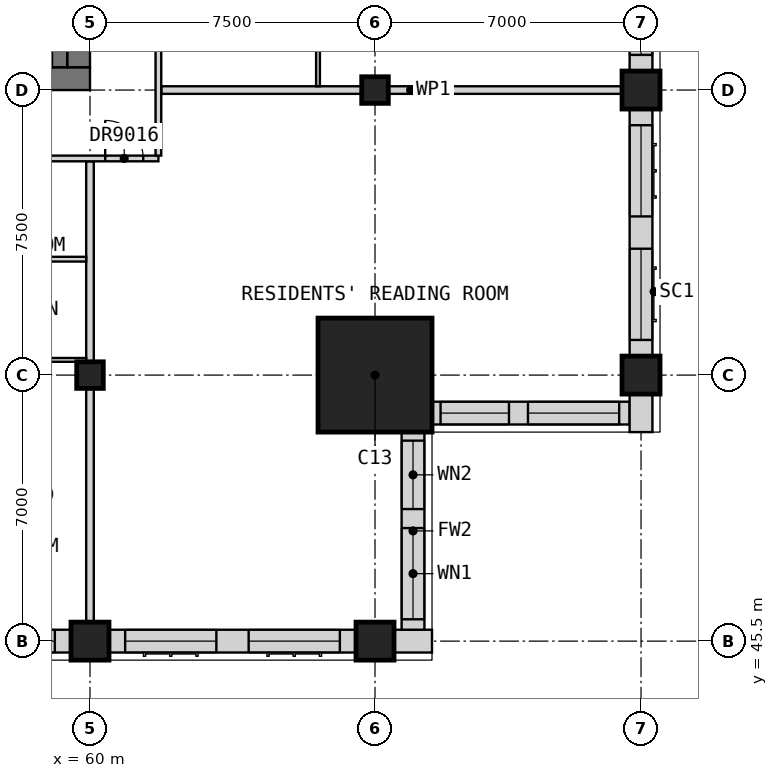
"""IFC4 building model, lengths in metres.
Left out: names, types, materials, properties, quantities, classifications, styles, units other than length and angle.
Written with IfcOpenShell. Run it as: python <this file> out.ifc"""

import sys

from ifc_helpers import new_model, si_unit, direction, frame, frame_2d, origin, origin_2d, place, context, subcontext, project, spatial, rectangle, extrude, element, fill, save


model = new_model("IFC4")
c1 = context("Model", 3, precision=1e-05, world=origin(), true_north=direction((0.0, 1.0)))
c2 = subcontext(c1, "Body", "Model", "MODEL_VIEW")
j1 = project(units=[si_unit("LENGTHUNIT", "METRE"), si_unit("PLANEANGLEUNIT", "RADIAN")], contexts=[c1])
p1 = place(None, origin())
s1 = spatial("IfcSite", under=j1, at=p1, CompositionType="ELEMENT")
p2 = place(p1, origin())
s2 = spatial("IfcBuilding", under=s1, at=p2, CompositionType="ELEMENT")
p3 = place(p2, frame((0.0, 0.0, 280.2)))
s3 = spatial("IfcBuildingStorey", under=s2, at=p3, CompositionType="ELEMENT", Elevation=280.2)
p4 = place(p3, frame((60.0, 45.5, 0.0), z_axis=(0.0, 0.0, 1.0), x_axis=(1.0, 0.0, 0.0)))
e1 = element("IfcColumn", 1, at=p4, inside=s3, PredefinedType="COLUMN", context=c2, shape_type="SweptSolid", body=[
    extrude(rectangle(XDim=1.0, YDim=1.0, at=origin_2d()), origin(), (0.0, 0.0, 1.0), 3.5),
])
p5 = place(p3, frame((60.0, 52.5, 0.0), z_axis=(0.0, 0.0, 1.0), x_axis=(1.0, 0.0, 0.0)))
e2 = element("IfcColumn", 2, at=p5, inside=s3, PredefinedType="COLUMN", context=c2, shape_type="SweptSolid", body=[
    extrude(rectangle(XDim=0.7, YDim=0.7, at=origin_2d()), origin(), (0.0, 0.0, 1.0), 3.5),
])
p6 = place(p3, frame((67.5, 45.5, 0.0), z_axis=(0.0, 0.0, 1.0), x_axis=(1.0, 0.0, 0.0)))
e3 = element("IfcColumn", 3, at=p6, inside=s3, PredefinedType="COLUMN", context=c2, shape_type="SweptSolid", body=[
    extrude(rectangle(XDim=1.0, YDim=1.0, at=origin_2d()), origin(), (0.0, 0.0, 1.0), 3.5),
])
p7 = place(p3, frame((67.5, 60.0, 0.0), z_axis=(0.0, 0.0, 1.0), x_axis=(1.0, 0.0, 0.0)))
e4 = element("IfcColumn", 4, at=p7, inside=s3, PredefinedType="COLUMN", context=c2, shape_type="SweptSolid", body=[
    extrude(rectangle(XDim=0.7, YDim=0.7, at=origin_2d()), origin(), (0.0, 0.0, 1.0), 3.5),
])
for number, where, z_axis, x_axis in (
    (5, (74.5, 52.5, 0.0), (0.0, 0.0, 1.0), (1.0, 0.0, 0.0)),
    (6, (74.5, 60.0, 0.0), (0.0, 0.0, 1.0), (1.0, 0.0, 0.0)),
):
    element("IfcColumn", number, at=place(p3, frame(where, z_axis=z_axis, x_axis=x_axis)), inside=s3, PredefinedType="COLUMN", context=c2, shape_type="SweptSolid", body=[
        extrude(rectangle(XDim=1.0, YDim=1.0, at=origin_2d()), origin(), (0.0, 0.0, 1.0), 3.5),
    ])
p8 = place(p3, frame((67.5, 52.5, 0.0), z_axis=(0.0, 0.0, 1.0), x_axis=(1.0, 0.0, 0.0)))
e7 = element("IfcColumn", 7, at=p8, inside=s3, PredefinedType="COLUMN", context=c2, shape_type="SweptSolid", body=[
    extrude(rectangle(XDim=3.0, YDim=3.0, at=origin_2d()), origin(), (0.0, 0.0, 1.0), 3.5),
])
p9 = place(p3, frame((30.0, 60.3, 0.0), z_axis=(0.0, 0.0, 1.0), x_axis=(1.0, 0.0, 0.0)))
e8 = element("IfcWall", 8, at=p9, inside=s3, PredefinedType="SHEAR", context=c2, shape_type="SweptSolid", body=[
    extrude(rectangle(XDim=30.0, YDim=0.6, at=frame_2d((15.0, 0.0))), origin(), (0.0, 0.0, 1.0), 3.5),
])
p10 = place(p9, frame((21.9, 0.0, 0.0)))
e9 = element("IfcOpeningElement", 9, at=p10, cuts=e8, PredefinedType="OPENING", context=c2, shape_type="SweptSolid", body=[
    extrude(rectangle(XDim=1.8, YDim=2.1, at=frame_2d((0.9, 1.05))), frame((0.0, 0.31, 0.0), z_axis=(0.0, -1.0, 0.0), x_axis=(1.0, 0.0, 0.0)), (0.0, 0.0, 1.0), 0.62),
])
p11 = place(p9, frame((26.5, 0.0, 0.0)))
e10 = element("IfcOpeningElement", 10, at=p11, cuts=e8, PredefinedType="OPENING", context=c2, shape_type="SweptSolid", body=[
    extrude(rectangle(XDim=1.2, YDim=2.1, at=frame_2d((0.6, 1.05))), frame((0.0, 0.31, 0.0), z_axis=(0.0, -1.0, 0.0), x_axis=(1.0, 0.0, 0.0)), (0.0, 0.0, 1.0), 0.62),
])
p12 = place(p3, frame((59.7, 60.6, 0.0), z_axis=(0.0, 0.0, 1.0), x_axis=(0.0, 1.0, 0.0)))
e11 = element("IfcWall", 11, at=p12, inside=s3, PredefinedType="SHEAR", context=c2, shape_type="SweptSolid", body=[
    extrude(rectangle(XDim=21.3, YDim=0.6, at=frame_2d((10.65, 0.0))), origin(), (0.0, 0.0, 1.0), 3.5),
])
p13 = place(p12, frame((14.9, 0.0, 0.0)))
e12 = element("IfcOpeningElement", 12, at=p13, cuts=e11, PredefinedType="OPENING", context=c2, shape_type="SweptSolid", body=[
    extrude(rectangle(XDim=1.8, YDim=2.1, at=frame_2d((0.9, 1.05))), frame((0.0, 0.31, 0.0), z_axis=(0.0, -1.0, 0.0), x_axis=(1.0, 0.0, 0.0)), (0.0, 0.0, 1.0), 0.62),
])
p14 = place(p3, frame((53.0, 45.5, 0.0), z_axis=(0.0, 0.0, 1.0), x_axis=(1.0, 0.0, 0.0)))
e13 = element("IfcWall", 13, at=p14, inside=s3, PredefinedType="SOLIDWALL", context=c2, shape_type="SweptSolid", body=[
    extrude(rectangle(XDim=6.5, YDim=0.6, at=frame_2d((3.25, 0.0))), origin(), (0.0, 0.0, 1.0), 2.75),
])
p15 = place(p14, frame((0.425, 0.0, 0.8)))
e14 = element("IfcOpeningElement", 14, at=p15, cuts=e13, PredefinedType="OPENING", context=c2, shape_type="SweptSolid", body=[
    extrude(rectangle(XDim=2.4, YDim=1.8, at=frame_2d((1.2, 0.9))), frame((0.0, 0.31, 0.0), z_axis=(0.0, -1.0, 0.0), x_axis=(1.0, 0.0, 0.0)), (0.0, 0.0, 1.0), 0.62),
])
p16 = place(p14, frame((3.675, 0.0, 0.8)))
e15 = element("IfcOpeningElement", 15, at=p16, cuts=e13, PredefinedType="OPENING", context=c2, shape_type="SweptSolid", body=[
    extrude(rectangle(XDim=2.4, YDim=1.8, at=frame_2d((1.2, 0.9))), frame((0.0, 0.31, 0.0), z_axis=(0.0, -1.0, 0.0), x_axis=(1.0, 0.0, 0.0)), (0.0, 0.0, 1.0), 0.62),
])
p17 = place(p3, frame((60.5, 45.5, 0.0), z_axis=(0.0, 0.0, 1.0), x_axis=(1.0, 0.0, 0.0)))
e16 = element("IfcWall", 16, at=p17, inside=s3, PredefinedType="SOLIDWALL", context=c2, shape_type="SweptSolid", body=[
    extrude(rectangle(XDim=6.5, YDim=0.6, at=frame_2d((3.25, 0.0))), origin(), (0.0, 0.0, 1.0), 2.75),
])
p18 = place(p17, frame((0.425, 0.0, 0.8)))
e17 = element("IfcOpeningElement", 17, at=p18, cuts=e16, PredefinedType="OPENING", context=c2, shape_type="SweptSolid", body=[
    extrude(rectangle(XDim=2.4, YDim=1.8, at=frame_2d((1.2, 0.9))), frame((0.0, 0.31, 0.0), z_axis=(0.0, -1.0, 0.0), x_axis=(1.0, 0.0, 0.0)), (0.0, 0.0, 1.0), 0.62),
])
p19 = place(p17, frame((3.675, 0.0, 0.8)))
e18 = element("IfcOpeningElement", 18, at=p19, cuts=e16, PredefinedType="OPENING", context=c2, shape_type="SweptSolid", body=[
    extrude(rectangle(XDim=2.4, YDim=1.8, at=frame_2d((1.2, 0.9))), frame((0.0, 0.31, 0.0), z_axis=(0.0, -1.0, 0.0), x_axis=(1.0, 0.0, 0.0)), (0.0, 0.0, 1.0), 0.62),
])
p20 = place(p3, frame((68.0, 45.5, 0.0), z_axis=(0.0, 0.0, 1.0), x_axis=(1.0, 0.0, 0.0)))
e19 = element("IfcWall", 19, at=p20, inside=s3, PredefinedType="SOLIDWALL", context=c2, shape_type="SweptSolid", body=[
    extrude(rectangle(XDim=1.0, YDim=0.6, at=frame_2d((0.5, 0.0))), origin(), (0.0, 0.0, 1.0), 3.25),
])
p21 = place(p3, frame((68.5, 45.8, 0.0), z_axis=(0.0, 0.0, 1.0), x_axis=(0.0, 1.0, 0.0)))
e20 = element("IfcWall", 20, at=p21, inside=s3, PredefinedType="SOLIDWALL", context=c2, shape_type="SweptSolid", body=[
    extrude(rectangle(XDim=5.2, YDim=0.6, at=frame_2d((2.6, 0.0))), origin(), (0.0, 0.0, 1.0), 3.25),
])
p22 = place(p21, frame((0.275, 0.0, 0.8)))
e21 = element("IfcOpeningElement", 21, at=p22, cuts=e20, PredefinedType="OPENING", context=c2, shape_type="SweptSolid", body=[
    extrude(rectangle(XDim=2.4, YDim=1.8, at=frame_2d((1.2, 0.9))), frame((0.0, 0.31, 0.0), z_axis=(0.0, -1.0, 0.0), x_axis=(1.0, 0.0, 0.0)), (0.0, 0.0, 1.0), 0.62),
])
p23 = place(p21, frame((3.175, 0.0, 0.8)))
e22 = element("IfcOpeningElement", 22, at=p23, cuts=e20, PredefinedType="OPENING", context=c2, shape_type="SweptSolid", body=[
    extrude(rectangle(XDim=1.8, YDim=1.8, at=frame_2d((0.9, 0.9))), frame((0.0, 0.31, 0.0), z_axis=(0.0, -1.0, 0.0), x_axis=(1.0, 0.0, 0.0)), (0.0, 0.0, 1.0), 0.62),
])
p24 = place(p3, frame((69.0, 51.5, 0.0), z_axis=(0.0, 0.0, 1.0), x_axis=(1.0, 0.0, 0.0)))
e23 = element("IfcWall", 23, at=p24, inside=s3, PredefinedType="SOLIDWALL", context=c2, shape_type="SweptSolid", body=[
    extrude(rectangle(XDim=5.2, YDim=0.6, at=frame_2d((2.6, 0.0))), origin(), (0.0, 0.0, 1.0), 3.25),
])
p25 = place(p24, frame((0.225, 0.0, 0.8)))
e24 = element("IfcOpeningElement", 24, at=p25, cuts=e23, PredefinedType="OPENING", context=c2, shape_type="SweptSolid", body=[
    extrude(rectangle(XDim=1.8, YDim=1.8, at=frame_2d((0.9, 0.9))), frame((0.0, 0.31, 0.0), z_axis=(0.0, -1.0, 0.0), x_axis=(1.0, 0.0, 0.0)), (0.0, 0.0, 1.0), 0.62),
])
p26 = place(p24, frame((2.525, 0.0, 0.8)))
e25 = element("IfcOpeningElement", 25, at=p26, cuts=e23, PredefinedType="OPENING", context=c2, shape_type="SweptSolid", body=[
    extrude(rectangle(XDim=2.4, YDim=1.8, at=frame_2d((1.2, 0.9))), frame((0.0, 0.31, 0.0), z_axis=(0.0, -1.0, 0.0), x_axis=(1.0, 0.0, 0.0)), (0.0, 0.0, 1.0), 0.62),
])
p27 = place(p3, frame((74.5, 51.0, 0.0), z_axis=(0.0, 0.0, 1.0), x_axis=(0.0, 1.0, 0.0)))
e26 = element("IfcWall", 26, at=p27, inside=s3, PredefinedType="SOLIDWALL", context=c2, shape_type="SweptSolid", body=[
    extrude(rectangle(XDim=1.0, YDim=0.6, at=frame_2d((0.5, 0.0))), origin(), (0.0, 0.0, 1.0), 3.25),
])
p28 = place(p3, frame((74.5, 53.0, 0.0), z_axis=(0.0, 0.0, 1.0), x_axis=(0.0, 1.0, 0.0)))
e27 = element("IfcWall", 27, at=p28, inside=s3, PredefinedType="SOLIDWALL", context=c2, shape_type="SweptSolid", body=[
    extrude(rectangle(XDim=6.5, YDim=0.6, at=frame_2d((3.25, 0.0))), origin(), (0.0, 0.0, 1.0), 2.75),
])
p29 = place(p28, frame((0.425, 0.0, 0.8)))
e28 = element("IfcOpeningElement", 28, at=p29, cuts=e27, PredefinedType="OPENING", context=c2, shape_type="SweptSolid", body=[
    extrude(rectangle(XDim=2.4, YDim=1.8, at=frame_2d((1.2, 0.9))), frame((0.0, 0.31, 0.0), z_axis=(0.0, -1.0, 0.0), x_axis=(1.0, 0.0, 0.0)), (0.0, 0.0, 1.0), 0.62),
])
p30 = place(p28, frame((3.675, 0.0, 0.8)))
e29 = element("IfcOpeningElement", 29, at=p30, cuts=e27, PredefinedType="OPENING", context=c2, shape_type="SweptSolid", body=[
    extrude(rectangle(XDim=2.4, YDim=1.8, at=frame_2d((1.2, 0.9))), frame((0.0, 0.31, 0.0), z_axis=(0.0, -1.0, 0.0), x_axis=(1.0, 0.0, 0.0)), (0.0, 0.0, 1.0), 0.62),
])
p31 = place(p3, frame((74.5, 60.5, 0.0), z_axis=(0.0, 0.0, 1.0), x_axis=(0.0, 1.0, 0.0)))
e30 = element("IfcWall", 30, at=p31, inside=s3, PredefinedType="SOLIDWALL", context=c2, shape_type="SweptSolid", body=[
    extrude(rectangle(XDim=6.5, YDim=0.6, at=frame_2d((3.25, 0.0))), origin(), (0.0, 0.0, 1.0), 2.75),
])
p32 = place(p31, frame((0.425, 0.0, 0.8)))
e31 = element("IfcOpeningElement", 31, at=p32, cuts=e30, PredefinedType="OPENING", context=c2, shape_type="SweptSolid", body=[
    extrude(rectangle(XDim=2.4, YDim=1.8, at=frame_2d((1.2, 0.9))), frame((0.0, 0.31, 0.0), z_axis=(0.0, -1.0, 0.0), x_axis=(1.0, 0.0, 0.0)), (0.0, 0.0, 1.0), 0.62),
])
p33 = place(p31, frame((3.675, 0.0, 0.8)))
e32 = element("IfcOpeningElement", 32, at=p33, cuts=e30, PredefinedType="OPENING", context=c2, shape_type="SweptSolid", body=[
    extrude(rectangle(XDim=2.4, YDim=1.8, at=frame_2d((1.2, 0.9))), frame((0.0, 0.31, 0.0), z_axis=(0.0, -1.0, 0.0), x_axis=(1.0, 0.0, 0.0)), (0.0, 0.0, 1.0), 0.62),
])
p34 = place(p3, frame((59.2, 60.6, 0.0), z_axis=(0.0, 0.0, 1.0), x_axis=(0.0, 1.0, 0.0)))
e33 = element("IfcWall", 33, at=p34, inside=s3, PredefinedType="SOLIDWALL", context=c2, shape_type="SweptSolid", body=[
    extrude(rectangle(XDim=7.9, YDim=0.4, at=frame_2d((3.95, 0.0))), origin(), (0.0, 0.0, 1.0), 3.25),
])
for number, where, z_axis, x_axis in (
    (34, (61.875, 60.0, 0.0), (0.0, 0.0, 1.0), (1.0, 0.0, 0.0)),
    (35, (60.0, 45.0, 0.0), (0.0, 0.0, 1.0), (0.0, 1.0, 0.0)),
):
    element("IfcWall", number, at=place(p3, frame(where, z_axis=z_axis, x_axis=x_axis)), inside=s3, PredefinedType="PARTITIONING", context=c2, shape_type="SweptSolid", body=[
        extrude(rectangle(XDim=13.125, YDim=0.2, at=frame_2d((6.562, 0.0))), origin(), (0.0, 0.0, 1.0), 3.25),
    ])
p35 = place(p3, frame((33.75, 58.2, 0.0), z_axis=(0.0, 0.0, 1.0), x_axis=(1.0, 0.0, 0.0)))
e36 = element("IfcWall", 36, at=p35, inside=s3, PredefinedType="PARTITIONING", context=c2, shape_type="SweptSolid", body=[
    extrude(rectangle(XDim=28.05, YDim=0.15, at=frame_2d((14.025, 0.0))), origin(), (0.0, 0.0, 1.0), 3.25),
])
p36 = place(p35, frame((3.25, 0.0, 0.0)))
e37 = element("IfcOpeningElement", 37, at=p36, cuts=e36, PredefinedType="OPENING", context=c2, shape_type="SweptSolid", body=[
    extrude(rectangle(XDim=1.0, YDim=2.1, at=frame_2d((0.5, 1.05))), frame((0.0, 0.085, 0.0), z_axis=(0.0, -1.0, 0.0), x_axis=(1.0, 0.0, 0.0)), (0.0, 0.0, 1.0), 0.17),
])
p37 = place(p35, frame((8.925, 0.0, 0.0)))
e38 = element("IfcOpeningElement", 38, at=p37, cuts=e36, PredefinedType="OPENING", context=c2, shape_type="SweptSolid", body=[
    extrude(rectangle(XDim=0.9, YDim=2.1, at=frame_2d((0.45, 1.05))), frame((0.0, 0.085, 0.0), z_axis=(0.0, -1.0, 0.0), x_axis=(1.0, 0.0, 0.0)), (0.0, 0.0, 1.0), 0.17),
])
p38 = place(p35, frame((20.175, 0.0, 0.0)))
e39 = element("IfcOpeningElement", 39, at=p38, cuts=e36, PredefinedType="OPENING", context=c2, shape_type="SweptSolid", body=[
    extrude(rectangle(XDim=0.9, YDim=2.1, at=frame_2d((0.45, 1.05))), frame((0.0, 0.085, 0.0), z_axis=(0.0, -1.0, 0.0), x_axis=(1.0, 0.0, 0.0)), (0.0, 0.0, 1.0), 0.17),
])
p39 = place(p35, frame((26.65, 0.0, 0.0)))
e40 = element("IfcOpeningElement", 40, at=p39, cuts=e36, PredefinedType="OPENING", context=c2, shape_type="SweptSolid", body=[
    extrude(rectangle(XDim=1.0, YDim=2.1, at=frame_2d((0.5, 1.05))), frame((0.0, 0.085, 0.0), z_axis=(0.0, -1.0, 0.0), x_axis=(1.0, 0.0, 0.0)), (0.0, 0.0, 1.0), 0.17),
])
p40 = place(p3, frame((61.8, 58.275, 0.0), z_axis=(0.0, 0.0, 1.0), x_axis=(0.0, 1.0, 0.0)))
e41 = element("IfcWall", 41, at=p40, inside=s3, PredefinedType="PARTITIONING", context=c2, shape_type="SweptSolid", body=[
    extrude(rectangle(XDim=25.95, YDim=0.15, at=frame_2d((12.975, 0.0))), origin(), (0.0, 0.0, 1.0), 3.25),
])
p41 = place(p40, frame((3.15, 0.0, 0.0)))
e42 = element("IfcOpeningElement", 42, at=p41, cuts=e41, PredefinedType="OPENING", context=c2, shape_type="SweptSolid", body=[
    extrude(rectangle(XDim=0.9, YDim=2.1, at=frame_2d((0.45, 1.05))), frame((0.0, 0.085, 0.0), z_axis=(0.0, -1.0, 0.0), x_axis=(1.0, 0.0, 0.0)), (0.0, 0.0, 1.0), 0.17),
])
p42 = place(p40, frame((18.15, 0.0, 0.0)))
e43 = element("IfcOpeningElement", 43, at=p42, cuts=e41, PredefinedType="OPENING", context=c2, shape_type="SweptSolid", body=[
    extrude(rectangle(XDim=0.9, YDim=2.1, at=frame_2d((0.45, 1.05))), frame((0.0, 0.085, 0.0), z_axis=(0.0, -1.0, 0.0), x_axis=(1.0, 0.0, 0.0)), (0.0, 0.0, 1.0), 0.17),
])
p43 = place(p3, frame((41.35, 52.9, 0.0), z_axis=(0.0, 0.0, 1.0), x_axis=(1.0, 0.0, 0.0)))
e44 = element("IfcWall", 44, at=p43, inside=s3, PredefinedType="PARTITIONING", context=c2, shape_type="SweptSolid", body=[
    extrude(rectangle(XDim=18.55, YDim=0.1, at=frame_2d((9.275, 0.0))), origin(), (0.0, 0.0, 1.0), 3.25),
])
p44 = place(p43, frame((1.325, 0.0, 0.0)))
e45 = element("IfcOpeningElement", 45, at=p44, cuts=e44, PredefinedType="OPENING", context=c2, shape_type="SweptSolid", body=[
    extrude(rectangle(XDim=0.9, YDim=2.1, at=frame_2d((0.45, 1.05))), frame((0.0, 0.06, 0.0), z_axis=(0.0, -1.0, 0.0), x_axis=(1.0, 0.0, 0.0)), (0.0, 0.0, 1.0), 0.12),
])
p45 = place(p43, frame((8.825, 0.0, 0.0)))
e46 = element("IfcOpeningElement", 46, at=p45, cuts=e44, PredefinedType="OPENING", context=c2, shape_type="SweptSolid", body=[
    extrude(rectangle(XDim=0.9, YDim=2.1, at=frame_2d((0.45, 1.05))), frame((0.0, 0.06, 0.0), z_axis=(0.0, -1.0, 0.0), x_axis=(1.0, 0.0, 0.0)), (0.0, 0.0, 1.0), 0.12),
])
p46 = place(p43, frame((12.575, 0.0, 0.0)))
e47 = element("IfcOpeningElement", 47, at=p46, cuts=e44, PredefinedType="OPENING", context=c2, shape_type="SweptSolid", body=[
    extrude(rectangle(XDim=0.9, YDim=2.1, at=frame_2d((0.45, 1.05))), frame((0.0, 0.06, 0.0), z_axis=(0.0, -1.0, 0.0), x_axis=(1.0, 0.0, 0.0)), (0.0, 0.0, 1.0), 0.12),
])
p47 = place(p3, frame((66.0, 60.1, 0.0), z_axis=(0.0, 0.0, 1.0), x_axis=(0.0, 1.0, 0.0)))
e48 = element("IfcWall", 48, at=p47, inside=s3, PredefinedType="PARTITIONING", context=c2, shape_type="SweptSolid", body=[
    extrude(rectangle(XDim=22.3, YDim=0.1, at=frame_2d((11.15, 0.0))), origin(), (0.0, 0.0, 1.0), 3.25),
])
p48 = place(p47, frame((1.325, 0.0, 0.0)))
e49 = element("IfcOpeningElement", 49, at=p48, cuts=e48, PredefinedType="OPENING", context=c2, shape_type="SweptSolid", body=[
    extrude(rectangle(XDim=0.9, YDim=2.1, at=frame_2d((0.45, 1.05))), frame((0.0, 0.06, 0.0), z_axis=(0.0, -1.0, 0.0), x_axis=(1.0, 0.0, 0.0)), (0.0, 0.0, 1.0), 0.12),
])
p49 = place(p47, frame((8.825, 0.0, 0.0)))
e50 = element("IfcOpeningElement", 50, at=p49, cuts=e48, PredefinedType="OPENING", context=c2, shape_type="SweptSolid", body=[
    extrude(rectangle(XDim=0.9, YDim=2.1, at=frame_2d((0.45, 1.05))), frame((0.0, 0.06, 0.0), z_axis=(0.0, -1.0, 0.0), x_axis=(1.0, 0.0, 0.0)), (0.0, 0.0, 1.0), 0.12),
])
p50 = place(p47, frame((12.575, 0.0, 0.0)))
e51 = element("IfcOpeningElement", 51, at=p50, cuts=e48, PredefinedType="OPENING", context=c2, shape_type="SweptSolid", body=[
    extrude(rectangle(XDim=0.9, YDim=2.1, at=frame_2d((0.45, 1.05))), frame((0.0, 0.06, 0.0), z_axis=(0.0, -1.0, 0.0), x_axis=(1.0, 0.0, 0.0)), (0.0, 0.0, 1.0), 0.12),
])
p51 = place(p47, frame((16.325, 0.0, 0.0)))
e52 = element("IfcOpeningElement", 52, at=p51, cuts=e48, PredefinedType="OPENING", context=c2, shape_type="SweptSolid", body=[
    extrude(rectangle(XDim=0.9, YDim=2.1, at=frame_2d((0.45, 1.05))), frame((0.0, 0.06, 0.0), z_axis=(0.0, -1.0, 0.0), x_axis=(1.0, 0.0, 0.0)), (0.0, 0.0, 1.0), 0.12),
])
p52 = place(p3, frame((56.25, 55.55, 0.0), z_axis=(0.0, 0.0, 1.0), x_axis=(1.0, 0.0, 0.0)))
e53 = element("IfcWall", 53, at=p52, inside=s3, PredefinedType="PARTITIONING", context=c2, shape_type="SweptSolid", body=[
    extrude(rectangle(XDim=3.65, YDim=0.125, at=frame_2d((1.825, 0.0))), origin(), (0.0, 0.0, 1.0), 3.25),
])
p53 = place(p16, origin())
e54 = element("IfcWindow", 54, at=p53, inside=s3, PartitioningType="SINGLE_PANEL", PredefinedType="WINDOW", context=c2, shape_type="SweptSolid", body=[
    extrude(rectangle(XDim=2.4, YDim=1.8, at=frame_2d((1.2, 0.9))), frame((0.0, -0.07, 0.0), z_axis=(0.0, -1.0, 0.0), x_axis=(1.0, 0.0, 0.0)), (0.0, 0.0, 1.0), 0.06),
])
fill(e15, e54)
p54 = place(p18, origin())
e55 = element("IfcWindow", 55, at=p54, inside=s3, PartitioningType="SINGLE_PANEL", PredefinedType="WINDOW", context=c2, shape_type="SweptSolid", body=[
    extrude(rectangle(XDim=2.4, YDim=1.8, at=frame_2d((1.2, 0.9))), frame((0.0, -0.07, 0.0), z_axis=(0.0, -1.0, 0.0), x_axis=(1.0, 0.0, 0.0)), (0.0, 0.0, 1.0), 0.06),
])
fill(e17, e55)
p55 = place(p19, origin())
e56 = element("IfcWindow", 56, at=p55, inside=s3, PartitioningType="SINGLE_PANEL", PredefinedType="WINDOW", context=c2, shape_type="SweptSolid", body=[
    extrude(rectangle(XDim=2.4, YDim=1.8, at=frame_2d((1.2, 0.9))), frame((0.0, -0.07, 0.0), z_axis=(0.0, -1.0, 0.0), x_axis=(1.0, 0.0, 0.0)), (0.0, 0.0, 1.0), 0.06),
])
fill(e18, e56)
p56 = place(p22, origin())
e57 = element("IfcWindow", 57, at=p56, inside=s3, PartitioningType="SINGLE_PANEL", PredefinedType="WINDOW", context=c2, shape_type="SweptSolid", body=[
    extrude(rectangle(XDim=2.4, YDim=1.8, at=frame_2d((1.2, 0.9))), frame((0.0, -0.07, 0.0), z_axis=(0.0, -1.0, 0.0), x_axis=(1.0, 0.0, 0.0)), (0.0, 0.0, 1.0), 0.06),
])
fill(e21, e57)
p57 = place(p23, origin())
e58 = element("IfcWindow", 58, at=p57, inside=s3, PartitioningType="SINGLE_PANEL", PredefinedType="WINDOW", context=c2, shape_type="SweptSolid", body=[
    extrude(rectangle(XDim=1.8, YDim=1.8, at=frame_2d((0.9, 0.9))), frame((0.0, -0.07, 0.0), z_axis=(0.0, -1.0, 0.0), x_axis=(1.0, 0.0, 0.0)), (0.0, 0.0, 1.0), 0.06),
])
fill(e22, e58)
p58 = place(p25, origin())
e59 = element("IfcWindow", 59, at=p58, inside=s3, PartitioningType="SINGLE_PANEL", PredefinedType="WINDOW", context=c2, shape_type="SweptSolid", body=[
    extrude(rectangle(XDim=1.8, YDim=1.8, at=frame_2d((0.9, 0.9))), frame((0.0, -0.07, 0.0), z_axis=(0.0, -1.0, 0.0), x_axis=(1.0, 0.0, 0.0)), (0.0, 0.0, 1.0), 0.06),
])
fill(e24, e59)
p59 = place(p26, origin())
e60 = element("IfcWindow", 60, at=p59, inside=s3, PartitioningType="SINGLE_PANEL", PredefinedType="WINDOW", context=c2, shape_type="SweptSolid", body=[
    extrude(rectangle(XDim=2.4, YDim=1.8, at=frame_2d((1.2, 0.9))), frame((0.0, -0.07, 0.0), z_axis=(0.0, -1.0, 0.0), x_axis=(1.0, 0.0, 0.0)), (0.0, 0.0, 1.0), 0.06),
])
fill(e25, e60)
p60 = place(p29, origin())
e61 = element("IfcWindow", 61, at=p60, inside=s3, PartitioningType="SINGLE_PANEL", PredefinedType="WINDOW", context=c2, shape_type="SweptSolid", body=[
    extrude(rectangle(XDim=2.4, YDim=1.8, at=frame_2d((1.2, 0.9))), frame((0.0, -0.07, 0.0), z_axis=(0.0, -1.0, 0.0), x_axis=(1.0, 0.0, 0.0)), (0.0, 0.0, 1.0), 0.06),
])
fill(e28, e61)
p61 = place(p30, origin())
e62 = element("IfcWindow", 62, at=p61, inside=s3, PartitioningType="SINGLE_PANEL", PredefinedType="WINDOW", context=c2, shape_type="SweptSolid", body=[
    extrude(rectangle(XDim=2.4, YDim=1.8, at=frame_2d((1.2, 0.9))), frame((0.0, -0.07, 0.0), z_axis=(0.0, -1.0, 0.0), x_axis=(1.0, 0.0, 0.0)), (0.0, 0.0, 1.0), 0.06),
])
fill(e29, e62)
p62 = place(p32, origin())
e63 = element("IfcWindow", 63, at=p62, inside=s3, PartitioningType="SINGLE_PANEL", PredefinedType="WINDOW", context=c2, shape_type="SweptSolid", body=[
    extrude(rectangle(XDim=2.4, YDim=1.8, at=frame_2d((1.2, 0.9))), frame((0.0, -0.07, 0.0), z_axis=(0.0, -1.0, 0.0), x_axis=(1.0, 0.0, 0.0)), (0.0, 0.0, 1.0), 0.06),
])
fill(e31, e63)
p63 = place(p39, origin())
e64 = element("IfcDoor", 64, at=p63, inside=s3, OperationType="SINGLE_SWING_RIGHT", PredefinedType="DOOR", context=c2, shape_type="SweptSolid", body=[
    extrude(rectangle(XDim=1.0, YDim=2.1, at=frame_2d((0.5, 1.05))), frame((0.0, 0.025, 0.0), z_axis=(0.0, -1.0, 0.0), x_axis=(1.0, 0.0, 0.0)), (0.0, 0.0, 1.0), 0.05),
])
fill(e40, e64)
save(model, sys.argv[1])
